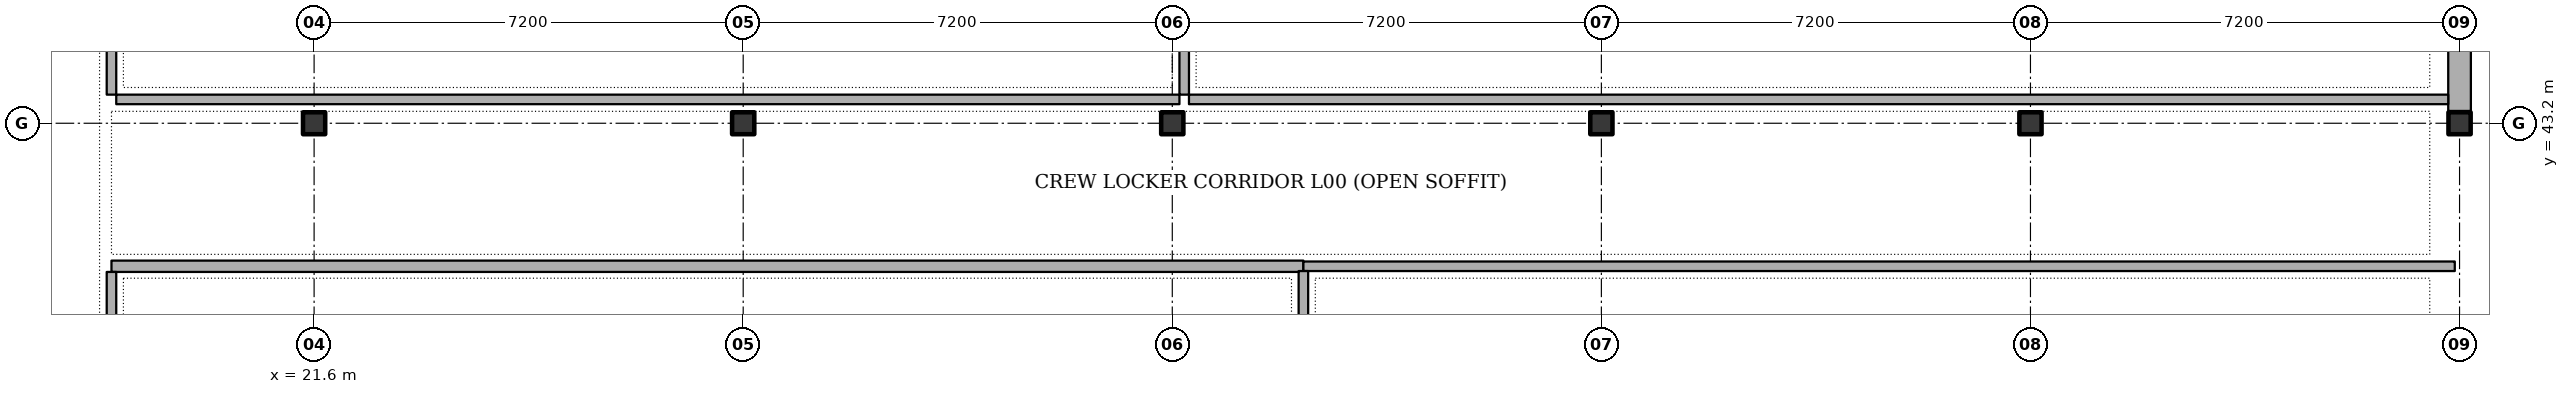
"""IFC4 building model, lengths in metres.
Left out: names, types, materials, properties, quantities, classifications, styles, units other than length and angle.
Written with IfcOpenShell. Run it as: python <this file> out.ifc"""

import sys

from ifc_helpers import new_model, si_unit, direction, frame, frame_2d, origin, origin_2d, place, context, subcontext, project, spatial, rectangle, i_section, extrude, element, fill, save


model = new_model("IFC4")
c1 = context("Model", 3, precision=1e-05, world=origin(), true_north=direction((0.0, 1.0)))
c2 = subcontext(c1, "Body", "Model", "MODEL_VIEW")
j1 = project(units=[si_unit("LENGTHUNIT", "METRE"), si_unit("PLANEANGLEUNIT", "RADIAN")], contexts=[c1])
p1 = place(None, origin())
s1 = spatial("IfcSite", under=j1, at=p1, CompositionType="ELEMENT")
p2 = place(p1, origin())
s2 = spatial("IfcBuilding", under=s1, at=p2, CompositionType="ELEMENT")
p3 = place(p2, origin())
s3 = spatial("IfcBuildingStorey", under=s2, at=p3, CompositionType="ELEMENT", Elevation=0.0)
for number, where, z_axis, x_axis in (
    (1, (21.6, 43.2, -0.3), (0.0, 0.0, 1.0), (1.0, 0.0, 0.0)),
    (2, (28.8, 43.2, -0.3), (0.0, 0.0, 1.0), (1.0, 0.0, 0.0)),
    (3, (36.0, 43.2, -0.3), (0.0, 0.0, 1.0), (1.0, 0.0, 0.0)),
    (4, (43.2, 43.2, -0.3), (0.0, 0.0, 1.0), (1.0, 0.0, 0.0)),
    (5, (50.4, 43.2, -0.3), (0.0, 0.0, 1.0), (1.0, 0.0, 0.0)),
    (6, (57.6, 43.2, -0.3), (0.0, 0.0, 1.0), (1.0, 0.0, 0.0)),
):
    element("IfcColumn", number, at=place(p3, frame(where, z_axis=z_axis, x_axis=x_axis)), inside=s3, PredefinedType="COLUMN", context=c2, shape_type="SweptSolid", body=[
        extrude(i_section(OverallWidth=0.373, OverallDepth=0.368, WebThickness=0.014, FlangeThickness=0.024, FilletRadius=0.015, at=origin_2d()), origin(), (0.0, 0.0, 1.0), 5.7),
    ])
p4 = place(p3, frame((57.6, 50.194, 0.0), z_axis=(0.0, 0.0, 1.0), x_axis=(0.0, -1.0, 0.0)))
e7 = element("IfcWall", 7, at=p4, inside=s3, PredefinedType="SOLIDWALL", context=c2, shape_type="SweptSolid", body=[
    extrude(rectangle(XDim=6.787, YDim=0.38, at=frame_2d((3.394, 0.0))), origin(), (0.0, 0.0, 1.0), 4.368),
])
p5 = place(p4, frame((2.444, 0.0, 0.0)))
e8 = element("IfcOpeningElement", 8, at=p5, cuts=e7, PredefinedType="OPENING", context=c2, shape_type="SweptSolid", body=[
    extrude(rectangle(XDim=1.9, YDim=2.25, at=frame_2d((0.95, 1.125))), frame((0.0, 0.2, 0.0), z_axis=(0.0, -1.0, 0.0), x_axis=(1.0, 0.0, 0.0)), (0.0, 0.0, 1.0), 0.4),
])
p6 = place(p3, frame((18.2, 40.8, 0.0), z_axis=(0.0, 0.0, 1.0), x_axis=(1.0, 0.0, 0.0)))
e9 = element("IfcWall", 9, at=p6, inside=s3, PredefinedType="PARTITIONING", context=c2, shape_type="SweptSolid", body=[
    extrude(rectangle(XDim=20.0, YDim=0.19, at=frame_2d((10.0, 0.0))), origin(), (0.0, 0.0, 1.0), 3.55),
])
p7 = place(p6, frame((13.7, 0.0, 0.0)))
e10 = element("IfcOpeningElement", 10, at=p7, cuts=e9, PredefinedType="OPENING", context=c2, shape_type="SweptSolid", body=[
    extrude(rectangle(XDim=1.52, YDim=2.06, at=frame_2d((0.76, 1.03))), frame((0.0, 0.105, 0.0), z_axis=(0.0, -1.0, 0.0), x_axis=(1.0, 0.0, 0.0)), (0.0, 0.0, 1.0), 0.21),
])
p8 = place(p3, frame((38.2, 40.8, 0.0), z_axis=(0.0, 0.0, 1.0), x_axis=(1.0, 0.0, 0.0)))
e11 = element("IfcWall", 11, at=p8, inside=s3, PredefinedType="PARTITIONING", context=c2, shape_type="SweptSolid", body=[
    extrude(rectangle(XDim=19.32, YDim=0.16, at=frame_2d((9.66, 0.0))), origin(), (0.0, 0.0, 1.0), 3.55),
])
p9 = place(p8, frame((15.09, 0.0, 0.0)))
e12 = element("IfcOpeningElement", 12, at=p9, cuts=e11, PredefinedType="OPENING", context=c2, shape_type="SweptSolid", body=[
    extrude(rectangle(XDim=1.58, YDim=2.08, at=frame_2d((0.79, 1.04))), frame((0.0, 0.09, 0.0), z_axis=(0.0, -1.0, 0.0), x_axis=(1.0, 0.0, 0.0)), (0.0, 0.0, 1.0), 0.18),
])
p10 = place(p3, frame((18.2, 28.68, 0.0), z_axis=(0.0, 0.0, 1.0), x_axis=(0.0, 1.0, 0.0)))
e13 = element("IfcWall", 13, at=p10, inside=s3, PredefinedType="PARTITIONING", context=c2, shape_type="SweptSolid", body=[
    extrude(rectangle(XDim=12.025, YDim=0.16, at=frame_2d((6.013, 0.0))), origin(), (0.0, 0.0, 1.0), 3.55),
])
p11 = place(p3, frame((38.2, 28.68, 0.0), z_axis=(0.0, 0.0, 1.0), x_axis=(0.0, 1.0, 0.0)))
e14 = element("IfcWall", 14, at=p11, inside=s3, PredefinedType="PARTITIONING", context=c2, shape_type="SweptSolid", body=[
    extrude(rectangle(XDim=12.04, YDim=0.16, at=frame_2d((6.02, 0.0))), origin(), (0.0, 0.0, 1.0), 3.55),
])
p12 = place(p3, frame((18.2, 43.68, 0.0), z_axis=(0.0, 0.0, 1.0), x_axis=(0.0, 1.0, 0.0)))
e15 = element("IfcWall", 15, at=p12, inside=s3, PredefinedType="PARTITIONING", context=c2, shape_type="SweptSolid", body=[
    extrude(rectangle(XDim=10.648, YDim=0.16, at=frame_2d((5.324, 0.0))), origin(), (0.0, 0.0, 1.0), 3.55),
])
p13 = place(p3, frame((36.2, 43.68, 0.0), z_axis=(0.0, 0.0, 1.0), x_axis=(0.0, 1.0, 0.0)))
e16 = element("IfcWall", 16, at=p13, inside=s3, PredefinedType="PARTITIONING", context=c2, shape_type="SweptSolid", body=[
    extrude(rectangle(XDim=6.534, YDim=0.16, at=frame_2d((3.267, 0.0))), origin(), (0.0, 0.0, 1.0), 3.55),
])
p14 = place(p3, frame((18.28, 43.6, 0.0), z_axis=(0.0, 0.0, 1.0), x_axis=(1.0, 0.0, 0.0)))
e17 = element("IfcWall", 17, at=p14, inside=s3, PredefinedType="PARTITIONING", context=c2, shape_type="SweptSolid", body=[
    extrude(rectangle(XDim=17.84, YDim=0.16, at=frame_2d((8.92, 0.0))), origin(), (0.0, 0.0, 1.0), 3.55),
])
p15 = place(p3, frame((36.28, 43.6, 0.0), z_axis=(0.0, 0.0, 1.0), x_axis=(1.0, 0.0, 0.0)))
e18 = element("IfcWall", 18, at=p15, inside=s3, PredefinedType="PARTITIONING", context=c2, shape_type="SweptSolid", body=[
    extrude(rectangle(XDim=21.13, YDim=0.16, at=frame_2d((10.565, 0.0))), origin(), (0.0, 0.0, 1.0), 3.55),
])
p16 = place(p7, origin())
e19 = element("IfcDoor", 19, at=p16, inside=s3, OperationType="SINGLE_SWING_LEFT", PredefinedType="DOOR", context=c2, shape_type="SweptSolid", body=[
    extrude(rectangle(XDim=1.52, YDim=2.06, at=frame_2d((0.76, 1.03))), frame((0.0, 0.025, 0.0), z_axis=(0.0, -1.0, 0.0), x_axis=(1.0, 0.0, 0.0)), (0.0, 0.0, 1.0), 0.05),
])
fill(e10, e19)
p17 = place(p9, origin())
e20 = element("IfcDoor", 20, at=p17, inside=s3, OperationType="SINGLE_SWING_RIGHT", PredefinedType="DOOR", context=c2, shape_type="SweptSolid", body=[
    extrude(rectangle(XDim=1.58, YDim=2.08, at=frame_2d((0.79, 1.04))), frame((0.0, 0.025, 0.0), z_axis=(0.0, -1.0, 0.0), x_axis=(1.0, 0.0, 0.0)), (0.0, 0.0, 1.0), 0.05),
])
fill(e12, e20)
save(model, sys.argv[1])
